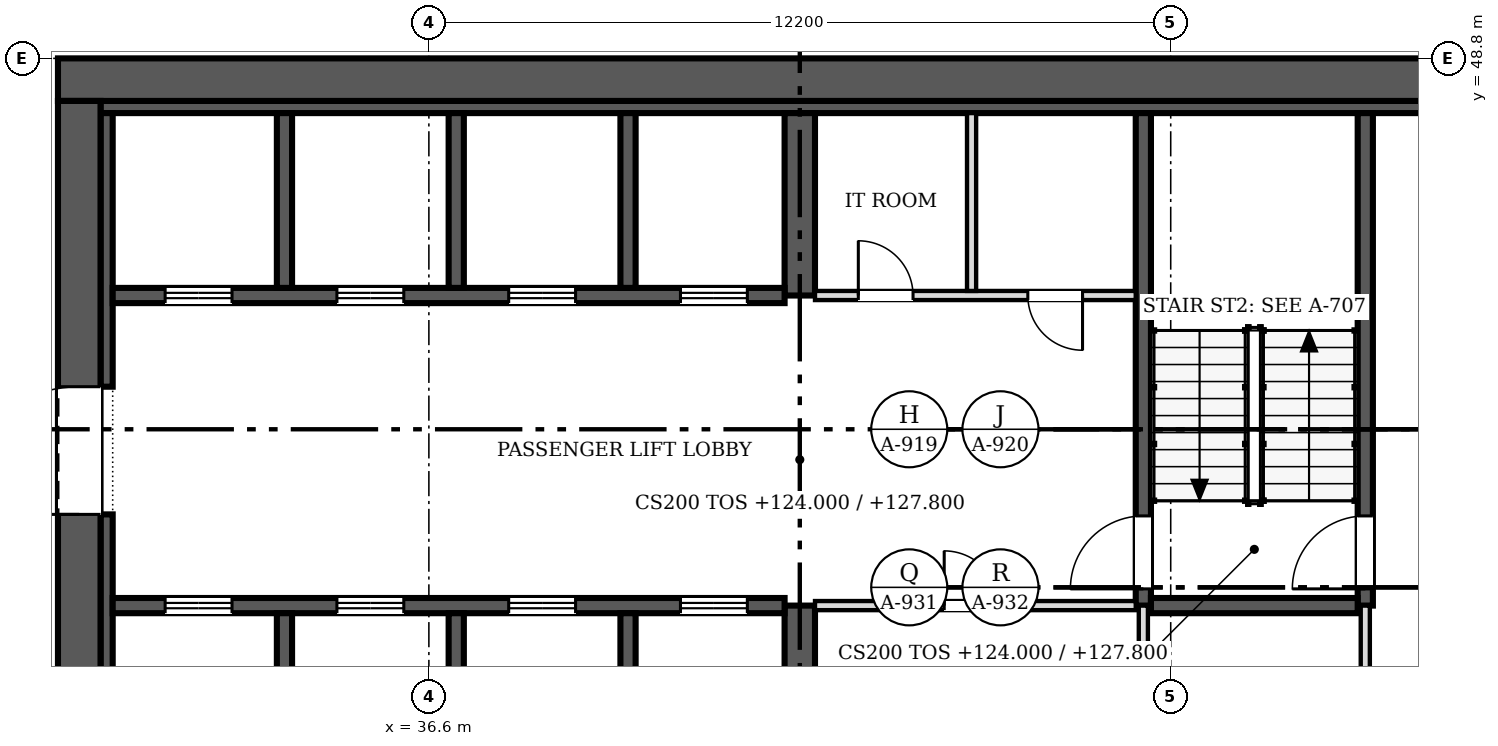
"""IFC4 building model, lengths in metres.
Left out: names, types, materials, properties, quantities, classifications, styles, units other than length and angle.
Written with IfcOpenShell. Run it as: python <this file> out.ifc"""

import sys

from ifc_helpers import new_model, si_unit, direction, frame, frame_2d, origin, place, context, subcontext, project, spatial, rectangle, extrude, source, transform, mapped, element, fill, save


model = new_model("IFC4")
c1 = context("Model", 3, precision=1e-05, world=origin(), true_north=direction((0.0, 1.0)))
c2 = subcontext(c1, "Body", "Model", "MODEL_VIEW")
j1 = project(units=[si_unit("LENGTHUNIT", "METRE"), si_unit("PLANEANGLEUNIT", "RADIAN")], contexts=[c1])
p1 = place(None, origin())
s1 = spatial("IfcSite", under=j1, at=p1, CompositionType="ELEMENT")
p2 = place(p1, origin())
s2 = spatial("IfcBuilding", under=s1, at=p2, CompositionType="ELEMENT")
p3 = place(p2, frame((0.0, 0.0, 124.0)))
s3 = spatial("IfcBuildingStorey", under=s2, at=p3, CompositionType="ELEMENT", Elevation=124.0)
p4 = place(p3, frame((30.85, 25.1, 0.0), z_axis=(0.0, 0.0, 1.0), x_axis=(0.0, 1.0, 0.0)))
e1 = element("IfcWall", 1, at=p4, inside=s3, PredefinedType="SHEAR", context=c2, shape_type="SweptSolid", body=[
    extrude(rectangle(XDim=23.0, YDim=0.7, at=frame_2d((11.5, 0.0))), origin(), (0.0, 0.0, 1.0), 3.8),
])
m1 = source(origin(), c2, "Body", "SweptSolid", [
    extrude(rectangle(XDim=2.1, YDim=2.4, at=frame_2d((1.05, 1.2))), frame((0.0, 0.36, 0.0), z_axis=(0.0, -1.0, 0.0), x_axis=(1.0, 0.0, 0.0)), (0.0, 0.0, 1.0), 0.72),
])
p5 = place(p4, frame((4.7, 0.0, 0.0)))
e2 = element("IfcOpeningElement", 2, at=p5, cuts=e1, PredefinedType="OPENING", context=c2, shape_type="MappedRepresentation", body=[
    mapped(m1, transform((0.0, 0.0, 0.0), scale=1.0)),
])
p6 = place(p4, frame((16.2, 0.0, 0.0)))
e3 = element("IfcOpeningElement", 3, at=p6, cuts=e1, PredefinedType="OPENING", context=c2, shape_type="MappedRepresentation", body=[
    mapped(m1, transform((0.0, 0.0, 0.0), scale=1.0)),
])
p7 = place(p3, frame((30.5, 48.45, 0.0), z_axis=(0.0, 0.0, 1.0), x_axis=(1.0, 0.0, 0.0)))
e4 = element("IfcWall", 4, at=p7, inside=s3, PredefinedType="SHEAR", context=c2, shape_type="SweptSolid", body=[
    extrude(rectangle(XDim=24.4, YDim=0.7, at=frame_2d((12.2, 0.0))), origin(), (0.0, 0.0, 1.0), 3.8),
])
p8 = place(p3, frame((31.2, 48.0, 0.0), z_axis=(0.0, 0.0, 1.0), x_axis=(1.0, 0.0, 0.0)))
e5 = element("IfcWall", 5, at=p8, inside=s3, PredefinedType="SOLIDWALL", context=c2, shape_type="SweptSolid", body=[
    extrude(rectangle(XDim=23.0, YDim=0.2, at=frame_2d((11.5, 0.0))), origin(), (0.0, 0.0, 1.0), 3.8),
])
p9 = place(p3, frame((31.3, 31.9, 0.0), z_axis=(0.0, 0.0, 1.0), x_axis=(0.0, 1.0, 0.0)))
e6 = element("IfcWall", 6, at=p9, inside=s3, PredefinedType="SOLIDWALL", context=c2, shape_type="SweptSolid", body=[
    extrude(rectangle(XDim=9.4, YDim=0.2, at=frame_2d((4.7, 0.0))), origin(), (0.0, 0.0, 1.0), 3.8),
])
p10 = place(p3, frame((31.3, 43.4, 0.0), z_axis=(0.0, 0.0, 1.0), x_axis=(0.0, 1.0, 0.0)))
e7 = element("IfcWall", 7, at=p10, inside=s3, PredefinedType="SOLIDWALL", context=c2, shape_type="SweptSolid", body=[
    extrude(rectangle(XDim=4.5, YDim=0.2, at=frame_2d((2.25, 0.0))), origin(), (0.0, 0.0, 1.0), 3.8),
])
p11 = place(p3, frame((42.7, 36.85, 0.0), z_axis=(0.0, 0.0, 1.0), x_axis=(0.0, 1.0, 0.0)))
e8 = element("IfcWall", 8, at=p11, inside=s3, PredefinedType="SHEAR", context=c2, shape_type="SweptSolid", body=[
    extrude(rectangle(XDim=2.95, YDim=0.5, at=frame_2d((1.475, 0.0))), origin(), (0.0, 0.0, 1.0), 3.8),
])
p12 = place(p3, frame((42.7, 44.9, 0.0), z_axis=(0.0, 0.0, 1.0), x_axis=(0.0, 1.0, 0.0)))
e9 = element("IfcWall", 9, at=p12, inside=s3, PredefinedType="SHEAR", context=c2, shape_type="SweptSolid", body=[
    extrude(rectangle(XDim=3.0, YDim=0.5, at=frame_2d((1.5, 0.0))), origin(), (0.0, 0.0, 1.0), 3.8),
])
p13 = place(p3, frame((31.4, 39.8, 0.0), z_axis=(0.0, 0.0, 1.0), x_axis=(1.0, 0.0, 0.0)))
e10 = element("IfcWall", 10, at=p13, inside=s3, PredefinedType="SOLIDWALL", context=c2, shape_type="SweptSolid", body=[
    extrude(rectangle(XDim=11.05, YDim=0.25, at=frame_2d((5.525, 0.0))), origin(), (0.0, 0.0, 1.0), 3.8),
])
m2 = source(origin(), c2, "Body", "SweptSolid", [
    extrude(rectangle(XDim=1.1, YDim=2.1, at=frame_2d((0.55, 1.05))), frame((0.0, 0.135, 0.0), z_axis=(0.0, -1.0, 0.0), x_axis=(1.0, 0.0, 0.0)), (0.0, 0.0, 1.0), 0.27),
])
p14 = place(p13, frame((0.863, 0.0, 0.0)))
e11 = element("IfcOpeningElement", 11, at=p14, cuts=e10, PredefinedType="OPENING", context=c2, shape_type="MappedRepresentation", body=[
    mapped(m2, transform((0.0, 0.0, 0.0), scale=1.0)),
])
p15 = place(p13, frame((3.688, 0.0, 0.0)))
e12 = element("IfcOpeningElement", 12, at=p15, cuts=e10, PredefinedType="OPENING", context=c2, shape_type="MappedRepresentation", body=[
    mapped(m2, transform((0.0, 0.0, 0.0), scale=1.0)),
])
p16 = place(p13, frame((6.512, 0.0, 0.0)))
e13 = element("IfcOpeningElement", 13, at=p16, cuts=e10, PredefinedType="OPENING", context=c2, shape_type="MappedRepresentation", body=[
    mapped(m2, transform((0.0, 0.0, 0.0), scale=1.0)),
])
p17 = place(p13, frame((9.337, 0.0, 0.0)))
e14 = element("IfcOpeningElement", 14, at=p17, cuts=e10, PredefinedType="OPENING", context=c2, shape_type="MappedRepresentation", body=[
    mapped(m2, transform((0.0, 0.0, 0.0), scale=1.0)),
])
p18 = place(p3, frame((42.45, 44.9, 0.0), z_axis=(0.0, 0.0, 1.0), x_axis=(-1.0, 0.0, 0.0)))
e15 = element("IfcWall", 15, at=p18, inside=s3, PredefinedType="SOLIDWALL", context=c2, shape_type="SweptSolid", body=[
    extrude(rectangle(XDim=11.05, YDim=0.25, at=frame_2d((5.525, 0.0))), origin(), (0.0, 0.0, 1.0), 3.8),
])
p19 = place(p18, frame((9.087, 0.0, 0.0)))
e16 = element("IfcOpeningElement", 16, at=p19, cuts=e15, PredefinedType="OPENING", context=c2, shape_type="MappedRepresentation", body=[
    mapped(m2, transform((0.0, 0.0, 0.0), scale=1.0)),
])
p20 = place(p18, frame((6.262, 0.0, 0.0)))
e17 = element("IfcOpeningElement", 17, at=p20, cuts=e15, PredefinedType="OPENING", context=c2, shape_type="MappedRepresentation", body=[
    mapped(m2, transform((0.0, 0.0, 0.0), scale=1.0)),
])
p21 = place(p18, frame((3.438, 0.0, 0.0)))
e18 = element("IfcOpeningElement", 18, at=p21, cuts=e15, PredefinedType="OPENING", context=c2, shape_type="MappedRepresentation", body=[
    mapped(m2, transform((0.0, 0.0, 0.0), scale=1.0)),
])
p22 = place(p18, frame((0.613, 0.0, 0.0)))
e19 = element("IfcOpeningElement", 19, at=p22, cuts=e15, PredefinedType="OPENING", context=c2, shape_type="MappedRepresentation", body=[
    mapped(m2, transform((0.0, 0.0, 0.0), scale=1.0)),
])
p23 = place(p3, frame((48.35, 47.9, 0.0), z_axis=(0.0, 0.0, 1.0), x_axis=(0.0, -1.0, 0.0)))
e20 = element("IfcWall", 20, at=p23, inside=s3, PredefinedType="SOLIDWALL", context=c2, shape_type="SweptSolid", body=[
    extrude(rectangle(XDim=8.1, YDim=0.25, at=frame_2d((4.05, 0.0))), origin(), (0.0, 0.0, 1.0), 3.8),
])
m3 = source(origin(), c2, "Body", "SweptSolid", [
    extrude(rectangle(XDim=1.2, YDim=2.1, at=frame_2d((0.6, 1.05))), frame((0.0, 0.135, 0.0), z_axis=(0.0, -1.0, 0.0), x_axis=(1.0, 0.0, 0.0)), (0.0, 0.0, 1.0), 0.27),
])
p24 = place(p23, frame((6.625, 0.0, 0.0)))
e21 = element("IfcOpeningElement", 21, at=p24, cuts=e20, PredefinedType="OPENING", context=c2, shape_type="MappedRepresentation", body=[
    mapped(m3, transform((0.0, 0.0, 0.0), scale=1.0)),
])
p25 = place(p3, frame((52.0, 39.8, 0.0), z_axis=(0.0, 0.0, 1.0), x_axis=(0.0, 1.0, 0.0)))
e22 = element("IfcWall", 22, at=p25, inside=s3, PredefinedType="SOLIDWALL", context=c2, shape_type="SweptSolid", body=[
    extrude(rectangle(XDim=8.1, YDim=0.25, at=frame_2d((4.05, 0.0))), origin(), (0.0, 0.0, 1.0), 3.8),
])
p26 = place(p25, frame((0.275, 0.0, 0.0)))
e23 = element("IfcOpeningElement", 23, at=p26, cuts=e22, PredefinedType="OPENING", context=c2, shape_type="MappedRepresentation", body=[
    mapped(m3, transform((0.0, 0.0, 0.0), scale=1.0)),
])
p27 = place(p3, frame((48.475, 39.8, 0.0), z_axis=(0.0, 0.0, 1.0), x_axis=(1.0, 0.0, 0.0)))
e24 = element("IfcWall", 24, at=p27, inside=s3, PredefinedType="SOLIDWALL", context=c2, shape_type="SweptSolid", body=[
    extrude(rectangle(XDim=3.4, YDim=0.25, at=frame_2d((1.7, 0.0))), origin(), (0.0, 0.0, 1.0), 3.8),
])
for number, where, z_axis, x_axis in (
    (25, (34.225, 36.85, 0.0), (0.0, 0.0, 1.0), (0.0, 1.0, 0.0)),
    (26, (37.05, 36.85, 0.0), (0.0, 0.0, 1.0), (0.0, 1.0, 0.0)),
    (27, (39.875, 36.85, 0.0), (0.0, 0.0, 1.0), (0.0, 1.0, 0.0)),
):
    element("IfcWall", number, at=place(p3, frame(where, z_axis=z_axis, x_axis=x_axis)), inside=s3, PredefinedType="SOLIDWALL", context=c2, shape_type="SweptSolid", body=[
        extrude(rectangle(XDim=2.825, YDim=0.25, at=frame_2d((1.413, 0.0))), origin(), (0.0, 0.0, 1.0), 3.8),
    ])
for number, where, z_axis, x_axis in (
    (28, (34.225, 45.025, 0.0), (0.0, 0.0, 1.0), (0.0, 1.0, 0.0)),
    (29, (37.05, 45.025, 0.0), (0.0, 0.0, 1.0), (0.0, 1.0, 0.0)),
    (30, (39.875, 45.025, 0.0), (0.0, 0.0, 1.0), (0.0, 1.0, 0.0)),
):
    element("IfcWall", number, at=place(p3, frame(where, z_axis=z_axis, x_axis=x_axis)), inside=s3, PredefinedType="SOLIDWALL", context=c2, shape_type="SweptSolid", body=[
        extrude(rectangle(XDim=2.875, YDim=0.25, at=frame_2d((1.438, 0.0))), origin(), (0.0, 0.0, 1.0), 3.8),
    ])
p28 = place(p3, frame((52.0, 33.525, 0.0), z_axis=(0.0, 0.0, 1.0), x_axis=(0.0, 1.0, 0.0)))
e31 = element("IfcWall", 31, at=p28, inside=s3, PredefinedType="PARTITIONING", context=c2, shape_type="SweptSolid", body=[
    extrude(rectangle(XDim=6.275, YDim=0.15, at=frame_2d((3.138, 0.0))), origin(), (0.0, 0.0, 1.0), 3.6),
])
m4 = source(origin(), c2, "Body", "SweptSolid", [
    extrude(rectangle(XDim=0.9, YDim=2.1, at=frame_2d((0.45, 1.05))), frame((0.0, 0.085, 0.0), z_axis=(0.0, -1.0, 0.0), x_axis=(1.0, 0.0, 0.0)), (0.0, 0.0, 1.0), 0.17),
])
p29 = place(p28, frame((1.025, 0.0, 0.0)))
e32 = element("IfcOpeningElement", 32, at=p29, cuts=e31, PredefinedType="OPENING", context=c2, shape_type="MappedRepresentation", body=[
    mapped(m4, transform((0.0, 0.0, 0.0), scale=1.0)),
])
p30 = place(p3, frame((48.225, 39.8, 0.0), z_axis=(0.0, 0.0, 1.0), x_axis=(-1.0, 0.0, 0.0)))
e33 = element("IfcWall", 33, at=p30, inside=s3, PredefinedType="PARTITIONING", context=c2, shape_type="SweptSolid", body=[
    extrude(rectangle(XDim=5.275, YDim=0.15, at=frame_2d((2.638, 0.0))), origin(), (0.0, 0.0, 1.0), 3.6),
])
p31 = place(p30, frame((2.25, 0.0, 0.0)))
e34 = element("IfcOpeningElement", 34, at=p31, cuts=e33, PredefinedType="OPENING", context=c2, shape_type="MappedRepresentation", body=[
    mapped(m4, transform((0.0, 0.0, 0.0), scale=1.0)),
])
p32 = place(p3, frame((42.95, 44.9, 0.0), z_axis=(0.0, 0.0, 1.0), x_axis=(1.0, 0.0, 0.0)))
e35 = element("IfcWall", 35, at=p32, inside=s3, PredefinedType="PARTITIONING", context=c2, shape_type="SweptSolid", body=[
    extrude(rectangle(XDim=5.275, YDim=0.15, at=frame_2d((2.638, 0.0))), origin(), (0.0, 0.0, 1.0), 3.6),
])
p33 = place(p32, frame((0.712, 0.0, 0.0)))
e36 = element("IfcOpeningElement", 36, at=p33, cuts=e35, PredefinedType="OPENING", context=c2, shape_type="MappedRepresentation", body=[
    mapped(m4, transform((0.0, 0.0, 0.0), scale=1.0)),
])
p34 = place(p32, frame((3.5, 0.0, 0.0)))
e37 = element("IfcOpeningElement", 37, at=p34, cuts=e35, PredefinedType="OPENING", context=c2, shape_type="MappedRepresentation", body=[
    mapped(m4, transform((0.0, 0.0, 0.0), scale=1.0)),
])
p35 = place(p3, frame((48.35, 36.85, 0.0), z_axis=(0.0, 0.0, 1.0), x_axis=(0.0, 1.0, 0.0)))
e38 = element("IfcWall", 38, at=p35, inside=s3, PredefinedType="PARTITIONING", context=c2, shape_type="SweptSolid", body=[
    extrude(rectangle(XDim=2.95, YDim=0.15, at=frame_2d((1.475, 0.0))), origin(), (0.0, 0.0, 1.0), 3.6),
])
p36 = place(p3, frame((45.525, 44.975, 0.0), z_axis=(0.0, 0.0, 1.0), x_axis=(0.0, 1.0, 0.0)))
e39 = element("IfcWall", 39, at=p36, inside=s3, PredefinedType="PARTITIONING", context=c2, shape_type="SweptSolid", body=[
    extrude(rectangle(XDim=2.925, YDim=0.15, at=frame_2d((1.462, 0.0))), origin(), (0.0, 0.0, 1.0), 3.6),
])
m5 = source(origin(), c2, "Body", "SweptSolid", [
    extrude(rectangle(XDim=2.1, YDim=2.4, at=frame_2d((1.05, 1.2))), frame((0.0, 0.025, 0.0), z_axis=(0.0, -1.0, 0.0), x_axis=(1.0, 0.0, 0.0)), (0.0, 0.0, 1.0), 0.05),
])
p37 = place(p6, origin())
e40 = element("IfcDoor", 40, at=p37, inside=s3, OperationType="DOUBLE_DOOR_SINGLE_SWING", PredefinedType="DOOR", context=c2, shape_type="MappedRepresentation", body=[
    mapped(m5, transform((0.0, 0.0, 0.0), scale=1.0)),
])
fill(e3, e40)
m6 = source(origin(), c2, "Body", "SweptSolid", [
    extrude(rectangle(XDim=1.1, YDim=2.1, at=frame_2d((0.55, 1.05))), frame((0.0, 0.025, 0.0), z_axis=(0.0, -1.0, 0.0), x_axis=(1.0, 0.0, 0.0)), (0.0, 0.0, 1.0), 0.05),
])
p38 = place(p14, origin())
e41 = element("IfcDoor", 41, at=p38, inside=s3, OperationType="DOUBLE_DOOR_SLIDING", PredefinedType="DOOR", context=c2, shape_type="MappedRepresentation", body=[
    mapped(m6, transform((0.0, 0.0, 0.0), scale=1.0)),
])
fill(e11, e41)
p39 = place(p15, origin())
e42 = element("IfcDoor", 42, at=p39, inside=s3, OperationType="DOUBLE_DOOR_SLIDING", PredefinedType="DOOR", context=c2, shape_type="MappedRepresentation", body=[
    mapped(m6, transform((0.0, 0.0, 0.0), scale=1.0)),
])
fill(e12, e42)
p40 = place(p16, origin())
e43 = element("IfcDoor", 43, at=p40, inside=s3, OperationType="DOUBLE_DOOR_SLIDING", PredefinedType="DOOR", context=c2, shape_type="MappedRepresentation", body=[
    mapped(m6, transform((0.0, 0.0, 0.0), scale=1.0)),
])
fill(e13, e43)
p41 = place(p17, origin())
e44 = element("IfcDoor", 44, at=p41, inside=s3, OperationType="DOUBLE_DOOR_SLIDING", PredefinedType="DOOR", context=c2, shape_type="MappedRepresentation", body=[
    mapped(m6, transform((0.0, 0.0, 0.0), scale=1.0)),
])
fill(e14, e44)
p42 = place(p19, origin())
e45 = element("IfcDoor", 45, at=p42, inside=s3, OperationType="DOUBLE_DOOR_SLIDING", PredefinedType="DOOR", context=c2, shape_type="MappedRepresentation", body=[
    mapped(m6, transform((0.0, 0.0, 0.0), scale=1.0)),
])
fill(e16, e45)
p43 = place(p20, origin())
e46 = element("IfcDoor", 46, at=p43, inside=s3, OperationType="DOUBLE_DOOR_SLIDING", PredefinedType="DOOR", context=c2, shape_type="MappedRepresentation", body=[
    mapped(m6, transform((0.0, 0.0, 0.0), scale=1.0)),
])
fill(e17, e46)
p44 = place(p21, origin())
e47 = element("IfcDoor", 47, at=p44, inside=s3, OperationType="DOUBLE_DOOR_SLIDING", PredefinedType="DOOR", context=c2, shape_type="MappedRepresentation", body=[
    mapped(m6, transform((0.0, 0.0, 0.0), scale=1.0)),
])
fill(e18, e47)
p45 = place(p22, origin())
e48 = element("IfcDoor", 48, at=p45, inside=s3, OperationType="DOUBLE_DOOR_SLIDING", PredefinedType="DOOR", context=c2, shape_type="MappedRepresentation", body=[
    mapped(m6, transform((0.0, 0.0, 0.0), scale=1.0)),
])
fill(e19, e48)
m7 = source(origin(), c2, "Body", "SweptSolid", [
    extrude(rectangle(XDim=1.2, YDim=2.1, at=frame_2d((0.6, 1.05))), frame((0.0, 0.025, 0.0), z_axis=(0.0, -1.0, 0.0), x_axis=(1.0, 0.0, 0.0)), (0.0, 0.0, 1.0), 0.05),
])
p46 = place(p24, origin())
e49 = element("IfcDoor", 49, at=p46, inside=s3, OperationType="SINGLE_SWING_RIGHT", PredefinedType="DOOR", context=c2, shape_type="MappedRepresentation", body=[
    mapped(m7, transform((0.0, 0.0, 0.0), scale=1.0)),
])
fill(e21, e49)
p47 = place(p26, origin())
e50 = element("IfcDoor", 50, at=p47, inside=s3, OperationType="SINGLE_SWING_LEFT", PredefinedType="DOOR", context=c2, shape_type="MappedRepresentation", body=[
    mapped(m7, transform((0.0, 0.0, 0.0), scale=1.0)),
])
fill(e23, e50)
m8 = source(origin(), c2, "Body", "SweptSolid", [
    extrude(rectangle(XDim=0.9, YDim=2.1, at=frame_2d((0.45, 1.05))), frame((0.0, 0.025, 0.0), z_axis=(0.0, -1.0, 0.0), x_axis=(1.0, 0.0, 0.0)), (0.0, 0.0, 1.0), 0.05),
])
p48 = place(p31, origin())
e51 = element("IfcDoor", 51, at=p48, inside=s3, OperationType="SINGLE_SWING_RIGHT", PredefinedType="DOOR", context=c2, shape_type="MappedRepresentation", body=[
    mapped(m8, transform((0.0, 0.0, 0.0), scale=1.0)),
])
fill(e34, e51)
p49 = place(p33, origin())
e52 = element("IfcDoor", 52, at=p49, inside=s3, OperationType="SINGLE_SWING_LEFT", PredefinedType="DOOR", context=c2, shape_type="MappedRepresentation", body=[
    mapped(m8, transform((0.0, 0.0, 0.0), scale=1.0)),
])
fill(e36, e52)
p50 = place(p34, origin())
e53 = element("IfcDoor", 53, at=p50, inside=s3, OperationType="SINGLE_SWING_RIGHT", PredefinedType="DOOR", context=c2, shape_type="MappedRepresentation", body=[
    mapped(m8, transform((0.0, 0.0, 0.0), scale=1.0)),
])
fill(e37, e53)
save(model, sys.argv[1])
